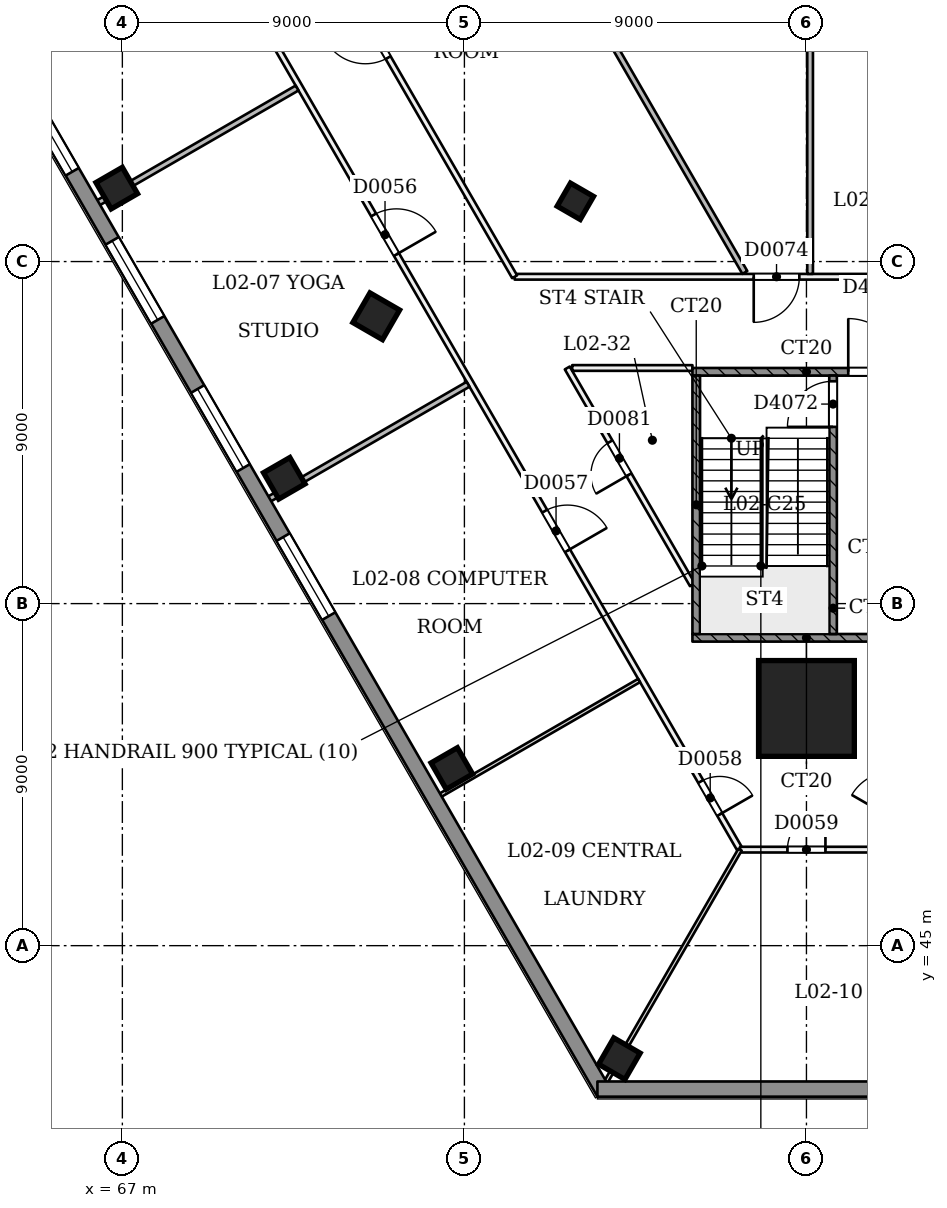
"""IFC4 building model, lengths in metres.
Left out: names, types, materials, properties, quantities, classifications, styles, units other than length and angle.
Written with IfcOpenShell. Run it as: python <this file> out.ifc"""

import sys

from ifc_helpers import new_model, si_unit, direction, frame, frame_2d, origin, origin_2d, place, context, subcontext, project, spatial, rectangle, extrude, element, fill, save


model = new_model("IFC4")
c1 = context("Model", 3, precision=1e-05, world=origin(), true_north=direction((0.0, 1.0)))
c2 = subcontext(c1, "Body", "Model", "MODEL_VIEW")
j1 = project(units=[si_unit("LENGTHUNIT", "METRE"), si_unit("PLANEANGLEUNIT", "RADIAN")], contexts=[c1])
p1 = place(None, origin())
s1 = spatial("IfcSite", under=j1, at=p1, CompositionType="ELEMENT")
p2 = place(p1, origin())
s2 = spatial("IfcBuilding", under=s1, at=p2, CompositionType="ELEMENT")
p3 = place(p2, frame((0.0, 0.0, 13.5)))
s3 = spatial("IfcBuildingStorey", under=s2, at=p3, CompositionType="ELEMENT", Elevation=13.5)
p4 = place(p3, frame((78.892, 64.538, -0.021), z_axis=(0.022221996839, 0.038427794534, 0.999014257888), x_axis=(-0.865946623326, -0.498656758727, 0.038443237712)))
e1 = element("IfcColumn", 1, at=p4, inside=s3, PredefinedType="COLUMN", context=c2, shape_type="SweptSolid", body=[
    extrude(rectangle(XDim=0.7, YDim=0.7, at=origin_2d()), origin(), (0.0, 0.0, 1.0), 4.504),
])
p5 = place(p3, frame((85.0, 51.171, 0.0), z_axis=(0.0, 0.058331497301, 0.998297268564), x_axis=(-1.0, 0.0, 0.0)))
e2 = element("IfcColumn", 2, at=p5, inside=s3, PredefinedType="COLUMN", context=c2, shape_type="SweptSolid", body=[
    extrude(rectangle(XDim=2.52, YDim=2.52, at=origin_2d()), origin(), (0.0, 0.0, 1.0), 4.508),
])
p6 = place(p3, frame((73.653, 61.513, -0.027), z_axis=(0.022221950523, 0.03848191432, 0.999012175694), x_axis=(-0.865641089157, -0.499183835908, 0.038483798288)))
e3 = element("IfcColumn", 3, at=p6, inside=s3, PredefinedType="COLUMN", context=c2, shape_type="SweptSolid", body=[
    extrude(rectangle(XDim=0.9, YDim=0.9, at=origin_2d()), origin(), (0.0, 0.0, 1.0), 4.504),
])
for number, where, z_axis, x_axis in (
    (4, (66.853, 64.932, 0.0), (0.0, 0.0, 1.0), (0.866, 0.5, 0.0)),
    (5, (71.261, 57.297, 0.0), (0.0, 0.0, 1.0), (0.866, 0.5, 0.0)),
    (6, (75.669, 49.662, 0.0), (0.0, 0.0, 1.0), (0.866, 0.5, 0.0)),
    (7, (80.077, 42.026, 0.0), (0.0, 0.0, 1.0), (0.5, 0.866, 0.0)),
):
    element("IfcColumn", number, at=place(p3, frame(where, z_axis=z_axis, x_axis=x_axis)), inside=s3, PredefinedType="COLUMN", context=c2, shape_type="SweptSolid", body=[
        extrude(rectangle(XDim=0.8, YDim=0.8, at=origin_2d()), origin(), (0.0, 0.0, 1.0), 4.5),
    ])
p7 = place(p3, frame((55.57, 95.474, 0.0), z_axis=(0.0, 0.0, 1.0), x_axis=(0.500000085768, -0.866025354266, 0.0)))
e8 = element("IfcWall", 8, at=p7, inside=s3, PredefinedType="PARTITIONING", context=c2, shape_type="SweptSolid", body=[
    extrude(rectangle(XDim=55.365, YDim=0.15, at=frame_2d((27.682, 0.0))), origin(), (0.0, 0.0, 1.0), 4.05),
])
p8 = place(p7, frame((6.832, 0.0, 0.0)))
e9 = element("IfcOpeningElement", 9, at=p8, cuts=e8, PredefinedType="OPENING", context=c2, shape_type="SweptSolid", body=[
    extrude(rectangle(XDim=1.2, YDim=2.1, at=frame_2d((0.6, 1.05))), frame((0.0, 0.085, 0.0), z_axis=(0.0, -1.0, 0.0), x_axis=(1.0, 0.0, 0.0)), (0.0, 0.0, 1.0), 0.171),
])
p9 = place(p7, frame((14.626, 0.0, 0.0)))
e10 = element("IfcOpeningElement", 10, at=p9, cuts=e8, PredefinedType="OPENING", context=c2, shape_type="SweptSolid", body=[
    extrude(rectangle(XDim=0.9, YDim=2.1, at=frame_2d((0.45, 1.05))), frame((0.0, 0.085, 0.0), z_axis=(0.0, -1.0, 0.0), x_axis=(1.0, 0.0, 0.0)), (0.0, 0.0, 1.0), 0.171),
])
p10 = place(p7, frame((16.876, 0.0, 0.0)))
e11 = element("IfcOpeningElement", 11, at=p10, cuts=e8, PredefinedType="OPENING", context=c2, shape_type="SweptSolid", body=[
    extrude(rectangle(XDim=0.9, YDim=2.1, at=frame_2d((0.45, 1.05))), frame((0.0, 0.085, 0.0), z_axis=(0.0, -1.0, 0.0), x_axis=(1.0, 0.0, 0.0)), (0.0, 0.0, 1.0), 0.171),
])
p11 = place(p7, frame((24.832, 0.0, 0.0)))
e12 = element("IfcOpeningElement", 12, at=p11, cuts=e8, PredefinedType="OPENING", context=c2, shape_type="SweptSolid", body=[
    extrude(rectangle(XDim=1.2, YDim=2.1, at=frame_2d((0.6, 1.05))), frame((0.0, 0.085, 0.0), z_axis=(0.0, -1.0, 0.0), x_axis=(1.0, 0.0, 0.0)), (0.0, 0.0, 1.0), 0.171),
])
p12 = place(p7, frame((36.082, 0.0, 0.0)))
e13 = element("IfcOpeningElement", 13, at=p12, cuts=e8, PredefinedType="OPENING", context=c2, shape_type="SweptSolid", body=[
    extrude(rectangle(XDim=1.2, YDim=2.1, at=frame_2d((0.6, 1.05))), frame((0.0, 0.085, 0.0), z_axis=(0.0, -1.0, 0.0), x_axis=(1.0, 0.0, 0.0)), (0.0, 0.0, 1.0), 0.171),
])
p13 = place(p7, frame((45.082, 0.0, 0.0)))
e14 = element("IfcOpeningElement", 14, at=p13, cuts=e8, PredefinedType="OPENING", context=c2, shape_type="SweptSolid", body=[
    extrude(rectangle(XDim=1.2, YDim=2.1, at=frame_2d((0.6, 1.05))), frame((0.0, 0.085, 0.0), z_axis=(0.0, -1.0, 0.0), x_axis=(1.0, 0.0, 0.0)), (0.0, 0.0, 1.0), 0.171),
])
p14 = place(p7, frame((53.295, 0.0, 0.0)))
e15 = element("IfcOpeningElement", 15, at=p14, cuts=e8, PredefinedType="OPENING", context=c2, shape_type="SweptSolid", body=[
    extrude(rectangle(XDim=1.0, YDim=2.1, at=frame_2d((0.5, 1.05))), frame((0.0, 0.085, 0.0), z_axis=(0.0, -1.0, 0.0), x_axis=(1.0, 0.0, 0.0)), (0.0, 0.0, 1.0), 0.171),
])
p15 = place(p3, frame((83.253, 47.526, 0.0), z_axis=(0.0, 0.0, 1.0), x_axis=(1.0, 0.0, 0.0)))
e16 = element("IfcWall", 16, at=p15, inside=s3, PredefinedType="PARTITIONING", context=c2, shape_type="SweptSolid", body=[
    extrude(rectangle(XDim=3.495, YDim=0.15, at=frame_2d((1.747, 0.0))), origin(), (0.0, 0.0, 1.0), 4.05),
])
p16 = place(p15, frame((1.247, 0.0, 0.0)))
e17 = element("IfcOpeningElement", 17, at=p16, cuts=e16, PredefinedType="OPENING", context=c2, shape_type="SweptSolid", body=[
    extrude(rectangle(XDim=1.0, YDim=2.1, at=frame_2d((0.5, 1.05))), frame((0.0, 0.085, 0.0), z_axis=(0.0, -1.0, 0.0), x_axis=(1.0, 0.0, 0.0)), (0.0, 0.0, 1.0), 0.171),
])
p17 = place(p3, frame((92.679, 62.6, 0.0), z_axis=(0.0, 0.0, 1.0), x_axis=(-1.0, 0.0, 0.0)))
e18 = element("IfcWall", 18, at=p17, inside=s3, PredefinedType="PARTITIONING", context=c2, shape_type="SweptSolid", body=[
    extrude(rectangle(XDim=15.357, YDim=0.15, at=frame_2d((7.679, 0.0))), origin(), (0.0, 0.0, 1.0), 4.05),
])
p18 = place(p17, frame((7.866, 0.0, 0.0)))
e19 = element("IfcOpeningElement", 19, at=p18, cuts=e18, PredefinedType="OPENING", context=c2, shape_type="SweptSolid", body=[
    extrude(rectangle(XDim=1.2, YDim=2.1, at=frame_2d((0.6, 1.05))), frame((0.0, 0.085, 0.0), z_axis=(0.0, -1.0, 0.0), x_axis=(1.0, 0.0, 0.0)), (0.0, 0.0, 1.0), 0.171),
])
p19 = place(p3, frame((77.321, 62.6, 0.0), z_axis=(0.0, 0.0, 1.0), x_axis=(-0.500000743568, 0.866024974485, 0.0)))
e20 = element("IfcWall", 20, at=p19, inside=s3, PredefinedType="PARTITIONING", context=c2, shape_type="SweptSolid", body=[
    extrude(rectangle(XDim=31.87, YDim=0.15, at=frame_2d((15.935, 0.0))), origin(), (0.0, 0.0, 1.0), 4.05),
])
p20 = place(p19, frame((22.081, 0.0, 0.0)))
e21 = element("IfcOpeningElement", 21, at=p20, cuts=e20, PredefinedType="OPENING", context=c2, shape_type="SweptSolid", body=[
    extrude(rectangle(XDim=1.0, YDim=2.1, at=frame_2d((0.5, 1.05))), frame((0.0, 0.085, 0.0), z_axis=(0.0, -1.0, 0.0), x_axis=(1.0, 0.0, 0.0)), (0.0, 0.0, 1.0), 0.171),
])
p21 = place(p19, frame((6.657, 0.0, 0.0)))
e22 = element("IfcOpeningElement", 22, at=p21, cuts=e20, PredefinedType="OPENING", context=c2, shape_type="SweptSolid", body=[
    extrude(rectangle(XDim=1.2, YDim=2.1, at=frame_2d((0.6, 1.05))), frame((0.0, 0.085, 0.0), z_axis=(0.0, -1.0, 0.0), x_axis=(1.0, 0.0, 0.0)), (0.0, 0.0, 1.0), 0.171),
])
p22 = place(p3, frame((82.0, 54.496, 0.0), z_axis=(0.0, 0.0, 1.0), x_axis=(-0.500010165703, 0.866019534533, 0.0)))
e23 = element("IfcWall", 23, at=p22, inside=s3, PredefinedType="PARTITIONING", context=c2, shape_type="SweptSolid", body=[
    extrude(rectangle(XDim=6.586, YDim=0.15, at=frame_2d((3.293, 0.0))), origin(), (0.0, 0.0, 1.0), 4.05),
])
p23 = place(p22, frame((3.342, 0.0, 0.0)))
e24 = element("IfcOpeningElement", 24, at=p23, cuts=e23, PredefinedType="OPENING", context=c2, shape_type="SweptSolid", body=[
    extrude(rectangle(XDim=1.0, YDim=2.1, at=frame_2d((0.5, 1.05))), frame((0.0, 0.085, 0.0), z_axis=(0.0, -1.0, 0.0), x_axis=(1.0, 0.0, 0.0)), (0.0, 0.0, 1.0), 0.171),
])
p24 = place(p3, frame((78.837, 60.2, 0.0), z_axis=(0.0, 0.0, 1.0), x_axis=(0.999999952341, -0.00030873725, 0.0)))
e25 = element("IfcWall", 25, at=p24, inside=s3, PredefinedType="PARTITIONING", context=c2, shape_type="SweptSolid", body=[
    extrude(rectangle(XDim=3.163, YDim=0.15, at=frame_2d((1.582, 0.0))), origin(), (0.0, 0.0, 1.0), 4.05),
])
for number, where, z_axis, x_axis in (
    (26, (66.119, 64.403, 0.0), (0.0, 0.0, 1.0), (0.866, 0.5, 0.0)),
    (27, (70.619, 56.609, 0.0), (0.0, 0.0, 1.0), (0.866, 0.5, 0.0)),
):
    element("IfcWall", number, at=place(p3, frame(where, z_axis=z_axis, x_axis=x_axis)), inside=s3, PredefinedType="PARTITIONING", context=c2, shape_type="SweptSolid", body=[
        extrude(rectangle(XDim=6.325, YDim=0.15, at=frame_2d((3.163, 0.0))), origin(), (0.0, 0.0, 1.0), 4.05),
    ])
p25 = place(p3, frame((75.119, 48.814, 0.0), z_axis=(0.0, 0.0, 1.0), x_axis=(0.866025537322, 0.499999768706, 0.0)))
e28 = element("IfcWall", 28, at=p25, inside=s3, PredefinedType="PARTITIONING", context=c2, shape_type="SweptSolid", body=[
    extrude(rectangle(XDim=6.325, YDim=0.1, at=frame_2d((3.163, 0.0))), origin(), (0.0, 0.0, 1.0), 4.05),
])
p26 = place(p3, frame((79.558, 41.126, 0.0), z_axis=(0.0, 0.0, 1.0), x_axis=(0.499969342782, 0.866043103014, 0.0)))
e29 = element("IfcWall", 29, at=p26, inside=s3, PredefinedType="PARTITIONING", context=c2, shape_type="SweptSolid", body=[
    extrude(rectangle(XDim=7.39, YDim=0.1, at=frame_2d((3.695, 0.0))), origin(), (0.0, 0.0, 1.0), 4.05),
])
p27 = place(p3, frame((83.379, 62.712, 0.0), z_axis=(0.0, 0.0, 1.0), x_axis=(-0.500003188093, 0.86602356313, 0.0)))
e30 = element("IfcWall", 30, at=p27, inside=s3, PredefinedType="PARTITIONING", context=c2, shape_type="SweptSolid", body=[
    extrude(rectangle(XDim=18.945, YDim=0.15, at=frame_2d((9.473, 0.0))), origin(), (0.0, 0.0, 1.0), 4.05),
])
p28 = place(p3, frame((85.096, 62.675, 0.0), z_axis=(0.0, 0.0, 1.0), x_axis=(0.0, 1.0, 0.0)))
e31 = element("IfcWall", 31, at=p28, inside=s3, PredefinedType="PARTITIONING", context=c2, shape_type="SweptSolid", body=[
    extrude(rectangle(XDim=7.463, YDim=0.15, at=frame_2d((3.731, 0.0))), origin(), (0.0, 0.0, 1.0), 4.05),
])
p29 = place(p3, frame((79.673, 41.126, 0.0), z_axis=(0.0, 0.0, 1.0), x_axis=(-0.499997306052, 0.866026959131, 0.0)))
e32 = element("IfcWall", 32, at=p29, inside=s3, PredefinedType="SOLIDWALL", context=c2, shape_type="SweptSolid", body=[
    extrude(rectangle(XDim=62.87, YDim=0.4, at=frame_2d((31.435, 0.0))), origin(), (0.0, 0.0, 1.0), 4.05),
])
p30 = place(p29, frame((54.986, 0.0, 0.9)))
e33 = element("IfcOpeningElement", 33, at=p30, cuts=e32, PredefinedType="OPENING", context=c2, shape_type="SweptSolid", body=[
    extrude(rectangle(XDim=2.4, YDim=1.5, at=frame_2d((1.2, 0.75))), frame((0.0, 0.21, 0.0), z_axis=(0.0, -1.0, 0.0), x_axis=(1.0, 0.0, 0.0)), (0.0, 0.0, 1.0), 0.421),
])
p31 = place(p29, frame((50.486, 0.0, 0.9)))
e34 = element("IfcOpeningElement", 34, at=p31, cuts=e32, PredefinedType="OPENING", context=c2, shape_type="SweptSolid", body=[
    extrude(rectangle(XDim=2.4, YDim=1.5, at=frame_2d((1.2, 0.75))), frame((0.0, 0.21, 0.0), z_axis=(0.0, -1.0, 0.0), x_axis=(1.0, 0.0, 0.0)), (0.0, 0.0, 1.0), 0.421),
])
p32 = place(p29, frame((45.986, 0.0, 0.9)))
e35 = element("IfcOpeningElement", 35, at=p32, cuts=e32, PredefinedType="OPENING", context=c2, shape_type="SweptSolid", body=[
    extrude(rectangle(XDim=2.4, YDim=1.5, at=frame_2d((1.2, 0.75))), frame((0.0, 0.21, 0.0), z_axis=(0.0, -1.0, 0.0), x_axis=(1.0, 0.0, 0.0)), (0.0, 0.0, 1.0), 0.421),
])
p33 = place(p29, frame((32.486, 0.0, 0.9)))
e36 = element("IfcOpeningElement", 36, at=p33, cuts=e32, PredefinedType="OPENING", context=c2, shape_type="SweptSolid", body=[
    extrude(rectangle(XDim=2.4, YDim=1.5, at=frame_2d((1.2, 0.75))), frame((0.0, 0.21, 0.0), z_axis=(0.0, -1.0, 0.0), x_axis=(1.0, 0.0, 0.0)), (0.0, 0.0, 1.0), 0.421),
])
p34 = place(p29, frame((27.986, 0.0, 0.9)))
e37 = element("IfcOpeningElement", 37, at=p34, cuts=e32, PredefinedType="OPENING", context=c2, shape_type="SweptSolid", body=[
    extrude(rectangle(XDim=2.4, YDim=1.5, at=frame_2d((1.2, 0.75))), frame((0.0, 0.21, 0.0), z_axis=(0.0, -1.0, 0.0), x_axis=(1.0, 0.0, 0.0)), (0.0, 0.0, 1.0), 0.421),
])
p35 = place(p29, frame((23.486, 0.0, 0.9)))
e38 = element("IfcOpeningElement", 38, at=p35, cuts=e32, PredefinedType="OPENING", context=c2, shape_type="SweptSolid", body=[
    extrude(rectangle(XDim=2.4, YDim=1.5, at=frame_2d((1.2, 0.75))), frame((0.0, 0.21, 0.0), z_axis=(0.0, -1.0, 0.0), x_axis=(1.0, 0.0, 0.0)), (0.0, 0.0, 1.0), 0.421),
])
p36 = place(p29, frame((18.986, 0.0, 0.9)))
e39 = element("IfcOpeningElement", 39, at=p36, cuts=e32, PredefinedType="OPENING", context=c2, shape_type="SweptSolid", body=[
    extrude(rectangle(XDim=2.4, YDim=1.5, at=frame_2d((1.2, 0.75))), frame((0.0, 0.21, 0.0), z_axis=(0.0, -1.0, 0.0), x_axis=(1.0, 0.0, 0.0)), (0.0, 0.0, 1.0), 0.421),
])
p37 = place(p29, frame((14.486, 0.0, 0.9)))
e40 = element("IfcOpeningElement", 40, at=p37, cuts=e32, PredefinedType="OPENING", context=c2, shape_type="SweptSolid", body=[
    extrude(rectangle(XDim=2.4, YDim=1.5, at=frame_2d((1.2, 0.75))), frame((0.0, 0.21, 0.0), z_axis=(0.0, -1.0, 0.0), x_axis=(1.0, 0.0, 0.0)), (0.0, 0.0, 1.0), 0.421),
])
p38 = place(p3, frame((90.5, 41.226, 0.0), z_axis=(0.0, 0.0, 1.0), x_axis=(-1.0, 0.0, 0.0)))
e41 = element("IfcWall", 41, at=p38, inside=s3, PredefinedType="SOLIDWALL", context=c2, shape_type="SweptSolid", body=[
    extrude(rectangle(XDim=11.0, YDim=0.4, at=frame_2d((5.5, 0.0))), origin(), (0.0, 0.0, 1.0), 4.05),
])
p39 = place(p3, frame((82.0, 60.1, 0.0), z_axis=(0.0, 0.0, 1.0), x_axis=(1.0, 0.0, 0.0)))
e42 = element("IfcWall", 42, at=p39, inside=s3, PredefinedType="SOLIDWALL", context=c2, shape_type="SweptSolid", body=[
    extrude(rectangle(XDim=6.0, YDim=0.2, at=frame_2d((3.0, 0.0))), origin(), (0.0, 0.0, 1.0), 4.05),
])
p40 = place(p39, frame((4.1, 0.0, 0.0)))
e43 = element("IfcOpeningElement", 43, at=p40, cuts=e42, PredefinedType="OPENING", context=c2, shape_type="SweptSolid", body=[
    extrude(rectangle(XDim=1.4, YDim=2.1, at=frame_2d((0.7, 1.05))), frame((0.0, 0.11, 0.0), z_axis=(0.0, -1.0, 0.0), x_axis=(1.0, 0.0, 0.0)), (0.0, 0.0, 1.0), 0.221),
])
p41 = place(p3, frame((82.0, 53.1, 0.0), z_axis=(0.0, 0.0, 1.0), x_axis=(1.0, 0.0, 0.0)))
e44 = element("IfcWall", 44, at=p41, inside=s3, PredefinedType="SOLIDWALL", context=c2, shape_type="SweptSolid", body=[
    extrude(rectangle(XDim=6.0, YDim=0.2, at=frame_2d((3.0, 0.0))), origin(), (0.0, 0.0, 1.0), 4.05),
])
p42 = place(p3, frame((82.1, 53.2, 0.0), z_axis=(0.0, 0.0, 1.0), x_axis=(0.0, 1.0, 0.0)))
e45 = element("IfcWall", 45, at=p42, inside=s3, PredefinedType="SOLIDWALL", context=c2, shape_type="SweptSolid", body=[
    extrude(rectangle(XDim=6.8, YDim=0.2, at=frame_2d((3.4, 0.0))), origin(), (0.0, 0.0, 1.0), 4.05),
])
p43 = place(p3, frame((85.7, 53.2, 0.0), z_axis=(0.0, 0.0, 1.0), x_axis=(0.0, 1.0, 0.0)))
e46 = element("IfcWall", 46, at=p43, inside=s3, PredefinedType="SOLIDWALL", context=c2, shape_type="SweptSolid", body=[
    extrude(rectangle(XDim=6.8, YDim=0.2, at=frame_2d((3.4, 0.0))), origin(), (0.0, 0.0, 1.0), 4.05),
])
p44 = place(p43, frame((5.45, 0.0, 0.0)))
e47 = element("IfcOpeningElement", 47, at=p44, cuts=e46, PredefinedType="OPENING", context=c2, shape_type="SweptSolid", body=[
    extrude(rectangle(XDim=1.2, YDim=2.1, at=frame_2d((0.6, 1.05))), frame((0.0, 0.11, 0.0), z_axis=(0.0, -1.0, 0.0), x_axis=(1.0, 0.0, 0.0)), (0.0, 0.0, 1.0), 0.221),
])
p45 = place(p12, origin())
e48 = element("IfcDoor", 48, at=p45, inside=s3, OperationType="SINGLE_SWING_RIGHT", PredefinedType="NOTDEFINED", context=c2, shape_type="SweptSolid", body=[
    extrude(rectangle(XDim=1.2, YDim=2.1, at=frame_2d((0.6, 1.05))), frame((0.0, 0.025, 0.0), z_axis=(0.0, -1.0, 0.0), x_axis=(1.0, 0.0, 0.0)), (0.0, 0.0, 1.0), 0.05),
])
fill(e13, e48)
p46 = place(p13, origin())
e49 = element("IfcDoor", 49, at=p46, inside=s3, OperationType="SINGLE_SWING_RIGHT", PredefinedType="NOTDEFINED", context=c2, shape_type="SweptSolid", body=[
    extrude(rectangle(XDim=1.2, YDim=2.1, at=frame_2d((0.6, 1.05))), frame((0.0, 0.025, 0.0), z_axis=(0.0, -1.0, 0.0), x_axis=(1.0, 0.0, 0.0)), (0.0, 0.0, 1.0), 0.05),
])
fill(e14, e49)
p47 = place(p14, origin())
e50 = element("IfcDoor", 50, at=p47, inside=s3, OperationType="SINGLE_SWING_RIGHT", PredefinedType="NOTDEFINED", context=c2, shape_type="SweptSolid", body=[
    extrude(rectangle(XDim=1.0, YDim=2.1, at=frame_2d((0.5, 1.05))), frame((0.0, 0.025, 0.0), z_axis=(0.0, -1.0, 0.0), x_axis=(1.0, 0.0, 0.0)), (0.0, 0.0, 1.0), 0.05),
])
fill(e15, e50)
p48 = place(p16, origin())
e51 = element("IfcDoor", 51, at=p48, inside=s3, OperationType="SINGLE_SWING_RIGHT", PredefinedType="NOTDEFINED", context=c2, shape_type="SweptSolid", body=[
    extrude(rectangle(XDim=1.0, YDim=2.1, at=frame_2d((0.5, 1.05))), frame((0.0, 0.025, 0.0), z_axis=(0.0, -1.0, 0.0), x_axis=(1.0, 0.0, 0.0)), (0.0, 0.0, 1.0), 0.05),
])
fill(e17, e51)
p49 = place(p21, origin())
e52 = element("IfcDoor", 52, at=p49, inside=s3, OperationType="SINGLE_SWING_RIGHT", PredefinedType="NOTDEFINED", context=c2, shape_type="SweptSolid", body=[
    extrude(rectangle(XDim=1.2, YDim=2.1, at=frame_2d((0.6, 1.05))), frame((0.0, 0.025, 0.0), z_axis=(0.0, -1.0, 0.0), x_axis=(1.0, 0.0, 0.0)), (0.0, 0.0, 1.0), 0.05),
])
fill(e22, e52)
p50 = place(p18, origin())
e53 = element("IfcDoor", 53, at=p50, inside=s3, OperationType="SINGLE_SWING_RIGHT", PredefinedType="NOTDEFINED", context=c2, shape_type="SweptSolid", body=[
    extrude(rectangle(XDim=1.2, YDim=2.1, at=frame_2d((0.6, 1.05))), frame((0.0, 0.025, 0.0), z_axis=(0.0, -1.0, 0.0), x_axis=(1.0, 0.0, 0.0)), (0.0, 0.0, 1.0), 0.05),
])
fill(e19, e53)
p51 = place(p23, origin())
e54 = element("IfcDoor", 54, at=p51, inside=s3, OperationType="SINGLE_SWING_LEFT", PredefinedType="NOTDEFINED", context=c2, shape_type="SweptSolid", body=[
    extrude(rectangle(XDim=1.0, YDim=2.1, at=frame_2d((0.5, 1.05))), frame((0.0, 0.025, 0.0), z_axis=(0.0, -1.0, 0.0), x_axis=(1.0, 0.0, 0.0)), (0.0, 0.0, 1.0), 0.05),
])
fill(e24, e54)
p52 = place(p34, origin())
e55 = element("IfcWindow", 55, at=p52, inside=s3, PartitioningType="SINGLE_PANEL", PredefinedType="WINDOW", context=c2, shape_type="SweptSolid", body=[
    extrude(rectangle(XDim=2.4, YDim=1.5, at=frame_2d((1.2, 0.75))), frame((0.0, 0.03, 0.0), z_axis=(0.0, -1.0, 0.0), x_axis=(1.0, 0.0, 0.0)), (0.0, 0.0, 1.0), 0.06),
])
fill(e37, e55)
p53 = place(p35, origin())
e56 = element("IfcWindow", 56, at=p53, inside=s3, PartitioningType="SINGLE_PANEL", PredefinedType="WINDOW", context=c2, shape_type="SweptSolid", body=[
    extrude(rectangle(XDim=2.4, YDim=1.5, at=frame_2d((1.2, 0.75))), frame((0.0, 0.03, 0.0), z_axis=(0.0, -1.0, 0.0), x_axis=(1.0, 0.0, 0.0)), (0.0, 0.0, 1.0), 0.06),
])
fill(e38, e56)
p54 = place(p36, origin())
e57 = element("IfcWindow", 57, at=p54, inside=s3, PartitioningType="SINGLE_PANEL", PredefinedType="WINDOW", context=c2, shape_type="SweptSolid", body=[
    extrude(rectangle(XDim=2.4, YDim=1.5, at=frame_2d((1.2, 0.75))), frame((0.0, 0.03, 0.0), z_axis=(0.0, -1.0, 0.0), x_axis=(1.0, 0.0, 0.0)), (0.0, 0.0, 1.0), 0.06),
])
fill(e39, e57)
p55 = place(p37, origin())
e58 = element("IfcWindow", 58, at=p55, inside=s3, PartitioningType="SINGLE_PANEL", PredefinedType="WINDOW", context=c2, shape_type="SweptSolid", body=[
    extrude(rectangle(XDim=2.4, YDim=1.5, at=frame_2d((1.2, 0.75))), frame((0.0, 0.03, 0.0), z_axis=(0.0, -1.0, 0.0), x_axis=(1.0, 0.0, 0.0)), (0.0, 0.0, 1.0), 0.06),
])
fill(e40, e58)
p56 = place(p40, origin())
e59 = element("IfcDoor", 59, at=p56, inside=s3, OperationType="SINGLE_SWING_LEFT", PredefinedType="NOTDEFINED", context=c2, shape_type="SweptSolid", body=[
    extrude(rectangle(XDim=1.4, YDim=2.1, at=frame_2d((0.7, 1.05))), frame((0.0, 0.025, 0.0), z_axis=(0.0, -1.0, 0.0), x_axis=(1.0, 0.0, 0.0)), (0.0, 0.0, 1.0), 0.05),
])
fill(e43, e59)
p57 = place(p44, frame((1.2, 0.0, 0.0), z_axis=(0.0, 0.0, 1.0), x_axis=(-1.0, 0.0, 0.0)))
e60 = element("IfcDoor", 60, at=p57, inside=s3, OperationType="SINGLE_SWING_LEFT", PredefinedType="NOTDEFINED", context=c2, shape_type="SweptSolid", body=[
    extrude(rectangle(XDim=1.2, YDim=2.1, at=frame_2d((0.6, 1.05))), frame((0.0, 0.025, 0.0), z_axis=(0.0, -1.0, 0.0), x_axis=(1.0, 0.0, 0.0)), (0.0, 0.0, 1.0), 0.05),
])
fill(e47, e60)
save(model, sys.argv[1])
